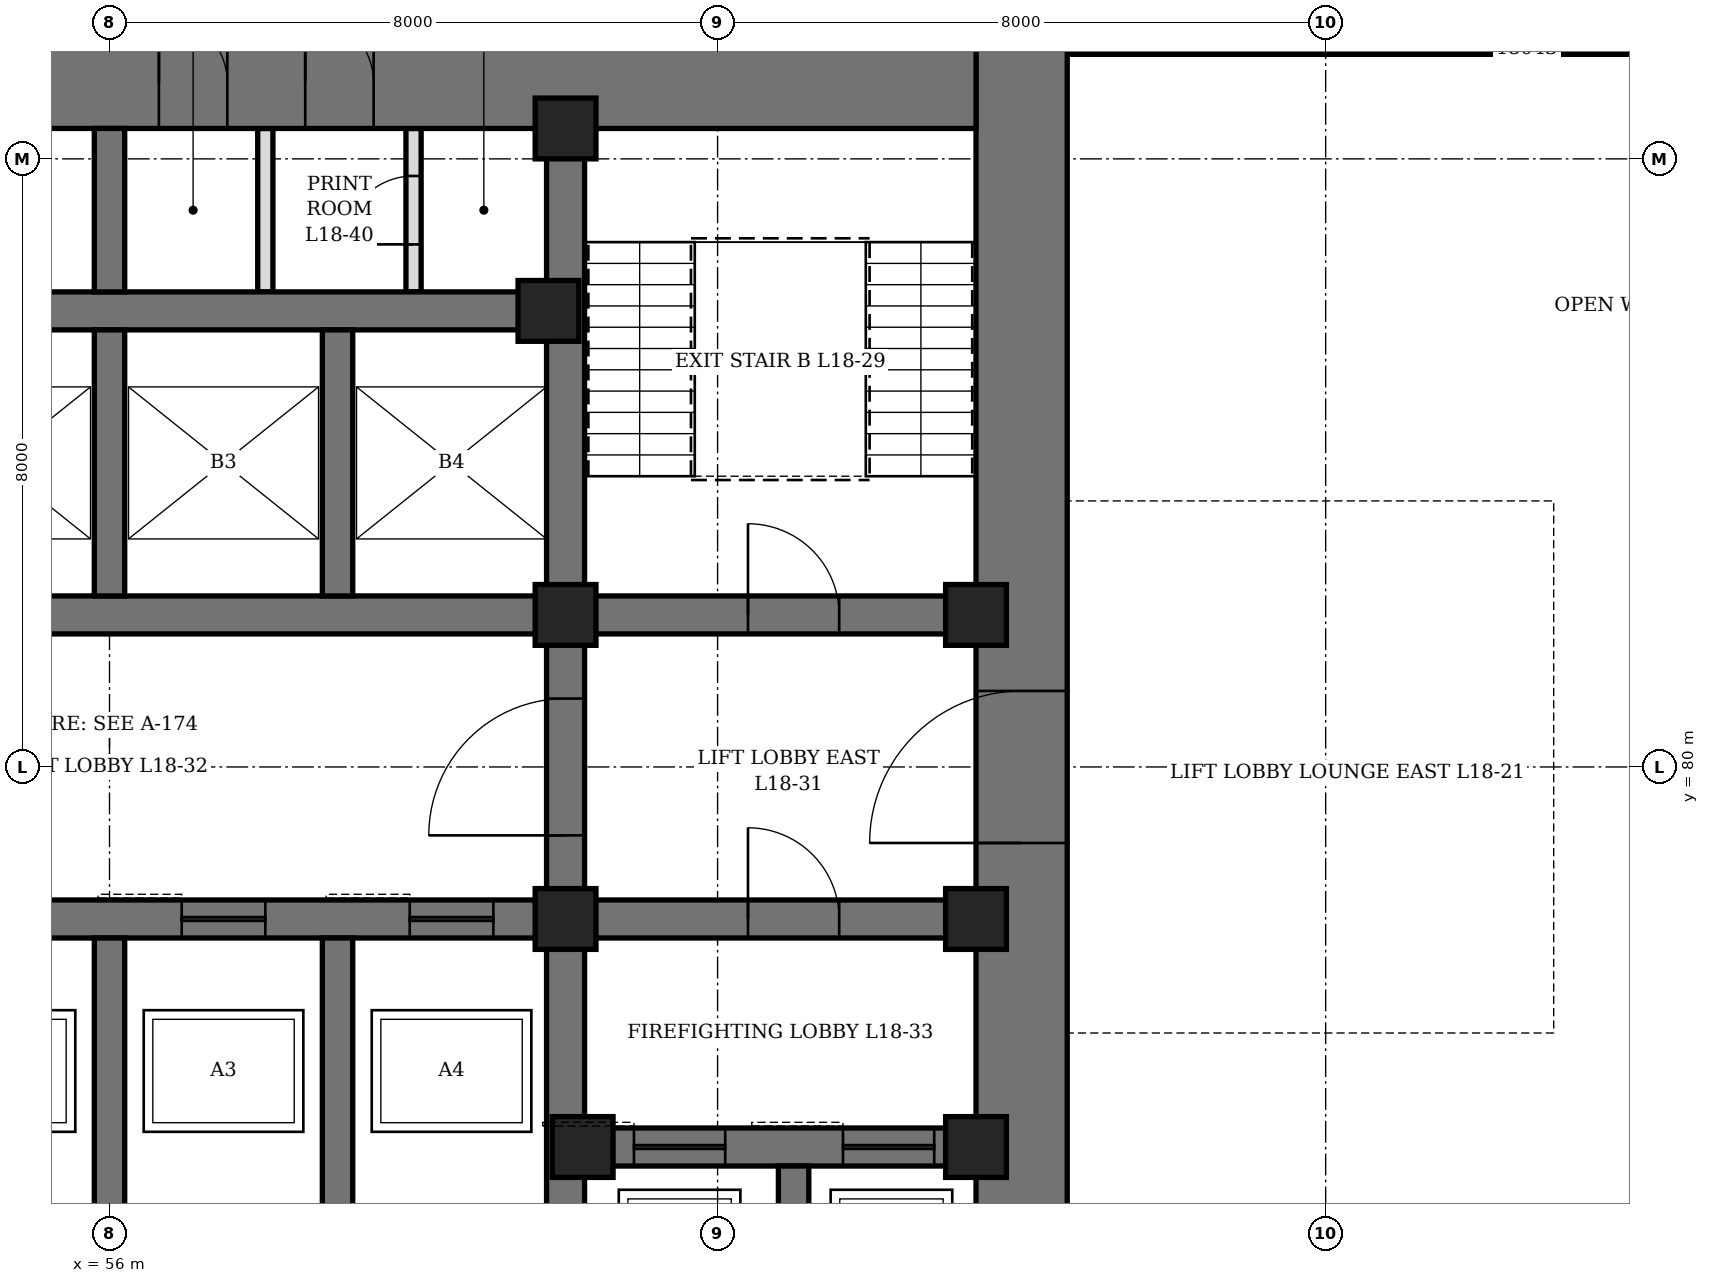
"""IFC4 building model, lengths in metres.
Left out: names, types, materials, properties, quantities, classifications, styles, units other than length and angle.
Written with IfcOpenShell. Run it as: python <this file> out.ifc"""

import sys

from ifc_helpers import new_model, si_unit, direction, frame, frame_2d, origin, origin_2d, place, context, subcontext, project, spatial, rectangle, hollow_rectangle, extrude, element, fill, save


model = new_model("IFC4")
c1 = context("Model", 3, precision=1e-05, world=origin(), true_north=direction((0.0, 1.0)))
c2 = subcontext(c1, "Body", "Model", "MODEL_VIEW")
j1 = project(units=[si_unit("LENGTHUNIT", "METRE"), si_unit("PLANEANGLEUNIT", "RADIAN")], contexts=[c1])
p1 = place(None, origin())
s1 = spatial("IfcSite", under=j1, at=p1, CompositionType="ELEMENT")
p2 = place(p1, origin())
s2 = spatial("IfcBuilding", under=s1, at=p2, CompositionType="ELEMENT")
p3 = place(p2, frame((0.0, 0.0, 85.3)))
s3 = spatial("IfcBuildingStorey", under=s2, at=p3, CompositionType="ELEMENT", Elevation=85.3)
p4 = place(p3, frame((68.0, 70.4, 0.0), z_axis=(0.0, 0.0, 1.0), x_axis=(0.0, 1.0, 0.0)))
e1 = element("IfcWall", 1, at=p4, inside=s3, PredefinedType="SHEAR", context=c2, shape_type="SweptSolid", body=[
    extrude(rectangle(XDim=19.2, YDim=1.2, at=frame_2d((9.6, 0.0))), origin(), (0.0, 0.0, 1.0), 4.2),
])
p5 = place(p4, frame((8.6, 0.0, 0.0)))
e2 = element("IfcOpeningElement", 2, at=p5, cuts=e1, PredefinedType="OPENING", context=c2, shape_type="SweptSolid", body=[
    extrude(rectangle(XDim=2.0, YDim=2.4, at=frame_2d((1.0, 1.2))), frame((0.0, 0.61, 0.0), z_axis=(0.0, -1.0, 0.0), x_axis=(1.0, 0.0, 0.0)), (0.0, 0.0, 1.0), 1.22),
])
p6 = place(p3, frame((44.6, 89.0, 0.0), z_axis=(0.0, 0.0, 1.0), x_axis=(1.0, 0.0, 0.0)))
e3 = element("IfcWall", 3, at=p6, inside=s3, PredefinedType="SHEAR", context=c2, shape_type="SweptSolid", body=[
    extrude(rectangle(XDim=22.8, YDim=1.2, at=frame_2d((11.4, 0.0))), origin(), (0.0, 0.0, 1.0), 4.2),
])
p7 = place(p6, frame((7.9, 0.0, 0.0)))
e4 = element("IfcOpeningElement", 4, at=p7, cuts=e3, PredefinedType="OPENING", context=c2, shape_type="SweptSolid", body=[
    extrude(rectangle(XDim=1.0, YDim=2.1, at=frame_2d((0.5, 1.05))), frame((0.0, 0.61, 0.0), z_axis=(0.0, -1.0, 0.0), x_axis=(1.0, 0.0, 0.0)), (0.0, 0.0, 1.0), 1.22),
])
p8 = place(p6, frame((12.05, 0.0, 0.0)))
e5 = element("IfcOpeningElement", 5, at=p8, cuts=e3, PredefinedType="OPENING", context=c2, shape_type="SweptSolid", body=[
    extrude(rectangle(XDim=0.9, YDim=2.1, at=frame_2d((0.45, 1.05))), frame((0.0, 0.61, 0.0), z_axis=(0.0, -1.0, 0.0), x_axis=(1.0, 0.0, 0.0)), (0.0, 0.0, 1.0), 1.22),
])
p9 = place(p6, frame((13.975, 0.0, 0.0)))
e6 = element("IfcOpeningElement", 6, at=p9, cuts=e3, PredefinedType="OPENING", context=c2, shape_type="SweptSolid", body=[
    extrude(rectangle(XDim=0.9, YDim=2.1, at=frame_2d((0.45, 1.05))), frame((0.0, 0.61, 0.0), z_axis=(0.0, -1.0, 0.0), x_axis=(1.0, 0.0, 0.0)), (0.0, 0.0, 1.0), 1.22),
])
p10 = place(p3, frame((62.0, 71.6, 0.0), z_axis=(0.0, 0.0, 1.0), x_axis=(0.0, 1.0, 0.0)))
e7 = element("IfcWall", 7, at=p10, inside=s3, PredefinedType="SHEAR", context=c2, shape_type="SweptSolid", body=[
    extrude(rectangle(XDim=16.8, YDim=0.5, at=frame_2d((8.4, 0.0))), origin(), (0.0, 0.0, 1.0), 4.2),
])
p11 = place(p10, frame((7.5, 0.0, 0.0)))
e8 = element("IfcOpeningElement", 8, at=p11, cuts=e7, PredefinedType="OPENING", context=c2, shape_type="SweptSolid", body=[
    extrude(rectangle(XDim=1.8, YDim=2.4, at=frame_2d((0.9, 1.2))), frame((0.0, 0.26, 0.0), z_axis=(0.0, -1.0, 0.0), x_axis=(1.0, 0.0, 0.0)), (0.0, 0.0, 1.0), 0.52),
])
p12 = place(p3, frame((62.25, 75.0, 0.0), z_axis=(0.0, 0.0, 1.0), x_axis=(1.0, 0.0, 0.0)))
e9 = element("IfcWall", 9, at=p12, inside=s3, PredefinedType="SHEAR", context=c2, shape_type="SweptSolid", body=[
    extrude(rectangle(XDim=5.15, YDim=0.5, at=frame_2d((2.575, 0.0))), origin(), (0.0, 0.0, 1.0), 4.2),
])
p13 = place(p12, frame((0.65, 0.0, 0.0)))
e10 = element("IfcOpeningElement", 10, at=p13, cuts=e9, PredefinedType="OPENING", context=c2, shape_type="SweptSolid", body=[
    extrude(rectangle(XDim=1.2, YDim=2.2, at=frame_2d((0.6, 1.1))), frame((0.0, 0.26, 0.0), z_axis=(0.0, -1.0, 0.0), x_axis=(1.0, 0.0, 0.0)), (0.0, 0.0, 1.0), 0.52),
])
p14 = place(p12, frame((3.4, 0.0, 0.0)))
e11 = element("IfcOpeningElement", 11, at=p14, cuts=e9, PredefinedType="OPENING", context=c2, shape_type="SweptSolid", body=[
    extrude(rectangle(XDim=1.2, YDim=2.2, at=frame_2d((0.6, 1.1))), frame((0.0, 0.26, 0.0), z_axis=(0.0, -1.0, 0.0), x_axis=(1.0, 0.0, 0.0)), (0.0, 0.0, 1.0), 0.52),
])
p15 = place(p3, frame((62.25, 78.0, 0.0), z_axis=(0.0, 0.0, 1.0), x_axis=(1.0, 0.0, 0.0)))
e12 = element("IfcWall", 12, at=p15, inside=s3, PredefinedType="SHEAR", context=c2, shape_type="SweptSolid", body=[
    extrude(rectangle(XDim=5.15, YDim=0.5, at=frame_2d((2.575, 0.0))), origin(), (0.0, 0.0, 1.0), 4.2),
])
p16 = place(p15, frame((2.15, 0.0, 0.0)))
e13 = element("IfcOpeningElement", 13, at=p16, cuts=e12, PredefinedType="OPENING", context=c2, shape_type="SweptSolid", body=[
    extrude(rectangle(XDim=1.2, YDim=2.1, at=frame_2d((0.6, 1.05))), frame((0.0, 0.26, 0.0), z_axis=(0.0, -1.0, 0.0), x_axis=(1.0, 0.0, 0.0)), (0.0, 0.0, 1.0), 0.52),
])
p17 = place(p3, frame((62.25, 82.0, 0.0), z_axis=(0.0, 0.0, 1.0), x_axis=(1.0, 0.0, 0.0)))
e14 = element("IfcWall", 14, at=p17, inside=s3, PredefinedType="SHEAR", context=c2, shape_type="SweptSolid", body=[
    extrude(rectangle(XDim=5.15, YDim=0.5, at=frame_2d((2.575, 0.0))), origin(), (0.0, 0.0, 1.0), 4.2),
])
p18 = place(p17, frame((2.15, 0.0, 0.0)))
e15 = element("IfcOpeningElement", 15, at=p18, cuts=e14, PredefinedType="OPENING", context=c2, shape_type="SweptSolid", body=[
    extrude(rectangle(XDim=1.2, YDim=2.1, at=frame_2d((0.6, 1.05))), frame((0.0, 0.26, 0.0), z_axis=(0.0, -1.0, 0.0), x_axis=(1.0, 0.0, 0.0)), (0.0, 0.0, 1.0), 0.52),
])
p19 = place(p3, frame((50.25, 78.0, 0.0), z_axis=(0.0, 0.0, 1.0), x_axis=(1.0, 0.0, 0.0)))
e16 = element("IfcWall", 16, at=p19, inside=s3, PredefinedType="SHEAR", context=c2, shape_type="SweptSolid", body=[
    extrude(rectangle(XDim=11.5, YDim=0.5, at=frame_2d((5.75, 0.0))), origin(), (0.0, 0.0, 1.0), 4.2),
])
p20 = place(p19, frame((0.7, 0.0, 0.0)))
e17 = element("IfcOpeningElement", 17, at=p20, cuts=e16, PredefinedType="OPENING", context=c2, shape_type="SweptSolid", body=[
    extrude(rectangle(XDim=1.1, YDim=2.2, at=frame_2d((0.55, 1.1))), frame((0.0, 0.26, 0.0), z_axis=(0.0, -1.0, 0.0), x_axis=(1.0, 0.0, 0.0)), (0.0, 0.0, 1.0), 0.52),
])
p21 = place(p19, frame((3.7, 0.0, 0.0)))
e18 = element("IfcOpeningElement", 18, at=p21, cuts=e16, PredefinedType="OPENING", context=c2, shape_type="SweptSolid", body=[
    extrude(rectangle(XDim=1.1, YDim=2.2, at=frame_2d((0.55, 1.1))), frame((0.0, 0.26, 0.0), z_axis=(0.0, -1.0, 0.0), x_axis=(1.0, 0.0, 0.0)), (0.0, 0.0, 1.0), 0.52),
])
p22 = place(p19, frame((6.7, 0.0, 0.0)))
e19 = element("IfcOpeningElement", 19, at=p22, cuts=e16, PredefinedType="OPENING", context=c2, shape_type="SweptSolid", body=[
    extrude(rectangle(XDim=1.1, YDim=2.2, at=frame_2d((0.55, 1.1))), frame((0.0, 0.26, 0.0), z_axis=(0.0, -1.0, 0.0), x_axis=(1.0, 0.0, 0.0)), (0.0, 0.0, 1.0), 0.52),
])
p23 = place(p19, frame((9.7, 0.0, 0.0)))
e20 = element("IfcOpeningElement", 20, at=p23, cuts=e16, PredefinedType="OPENING", context=c2, shape_type="SweptSolid", body=[
    extrude(rectangle(XDim=1.1, YDim=2.2, at=frame_2d((0.55, 1.1))), frame((0.0, 0.26, 0.0), z_axis=(0.0, -1.0, 0.0), x_axis=(1.0, 0.0, 0.0)), (0.0, 0.0, 1.0), 0.52),
])
for number, where, z_axis, x_axis in (
    (21, (50.25, 82.0, 0.0), (0.0, 0.0, 1.0), (1.0, 0.0, 0.0)),
    (22, (50.25, 86.0, 0.0), (0.0, 0.0, 1.0), (1.0, 0.0, 0.0)),
):
    element("IfcWall", number, at=place(p3, frame(where, z_axis=z_axis, x_axis=x_axis)), inside=s3, PredefinedType="SHEAR", context=c2, shape_type="SweptSolid", body=[
        extrude(rectangle(XDim=11.5, YDim=0.5, at=frame_2d((5.75, 0.0))), origin(), (0.0, 0.0, 1.0), 4.2),
    ])
p24 = place(p3, frame((56.0, 74.2, 0.0), z_axis=(0.0, 0.0, 1.0), x_axis=(0.0, 1.0, 0.0)))
e23 = element("IfcWall", 23, at=p24, inside=s3, PredefinedType="SHEAR", context=c2, shape_type="SweptSolid", body=[
    extrude(rectangle(XDim=3.55, YDim=0.4, at=frame_2d((1.775, 0.0))), origin(), (0.0, 0.0, 1.0), 4.2),
])
p25 = place(p3, frame((56.0, 82.25, 0.0), z_axis=(0.0, 0.0, 1.0), x_axis=(0.0, 1.0, 0.0)))
e24 = element("IfcWall", 24, at=p25, inside=s3, PredefinedType="SHEAR", context=c2, shape_type="SweptSolid", body=[
    extrude(rectangle(XDim=3.5, YDim=0.4, at=frame_2d((1.75, 0.0))), origin(), (0.0, 0.0, 1.0), 4.2),
])
p26 = place(p3, frame((59.0, 74.2, 0.0), z_axis=(0.0, 0.0, 1.0), x_axis=(0.0, 1.0, 0.0)))
e25 = element("IfcWall", 25, at=p26, inside=s3, PredefinedType="SHEAR", context=c2, shape_type="SweptSolid", body=[
    extrude(rectangle(XDim=3.55, YDim=0.4, at=frame_2d((1.775, 0.0))), origin(), (0.0, 0.0, 1.0), 4.2),
])
p27 = place(p3, frame((59.0, 82.25, 0.0), z_axis=(0.0, 0.0, 1.0), x_axis=(0.0, 1.0, 0.0)))
e26 = element("IfcWall", 26, at=p27, inside=s3, PredefinedType="SHEAR", context=c2, shape_type="SweptSolid", body=[
    extrude(rectangle(XDim=3.5, YDim=0.4, at=frame_2d((1.75, 0.0))), origin(), (0.0, 0.0, 1.0), 4.2),
])
p28 = place(p3, frame((65.0, 71.6, 0.0), z_axis=(0.0, 0.0, 1.0), x_axis=(0.0, 1.0, 0.0)))
e27 = element("IfcWall", 27, at=p28, inside=s3, PredefinedType="SHEAR", context=c2, shape_type="SweptSolid", body=[
    extrude(rectangle(XDim=3.15, YDim=0.4, at=frame_2d((1.575, 0.0))), origin(), (0.0, 0.0, 1.0), 4.2),
])
p29 = place(p3, frame((56.0, 86.25, 0.0), z_axis=(0.0, 0.0, 1.0), x_axis=(0.0, 1.0, 0.0)))
e28 = element("IfcWall", 28, at=p29, inside=s3, PredefinedType="SHEAR", context=c2, shape_type="SweptSolid", body=[
    extrude(rectangle(XDim=2.15, YDim=0.4, at=frame_2d((1.075, 0.0))), origin(), (0.0, 0.0, 1.0), 4.2),
])
for number, where, z_axis, x_axis in (
    (29, (61.775, 86.0, 0.0), (0.0, 0.0, 1.0), (1.0, 0.0, 0.0)),
    (30, (62.0, 78.0, 0.0), (0.0, 0.0, 1.0), (1.0, 0.0, 0.0)),
    (31, (62.0, 82.0, 0.0), (0.0, 0.0, 1.0), (1.0, 0.0, 0.0)),
    (32, (62.0, 88.4, 0.0), (0.0, 0.0, 1.0), (1.0, 0.0, 0.0)),
    (33, (62.225, 75.0, 0.0), (0.0, 0.0, 1.0), (1.0, 0.0, 0.0)),
    (34, (67.4, 75.0, 0.0), (0.0, 0.0, 1.0), (1.0, 0.0, 0.0)),
    (35, (67.4, 78.0, 0.0), (0.0, 0.0, 1.0), (1.0, 0.0, 0.0)),
    (36, (67.4, 82.0, 0.0), (0.0, 0.0, 1.0), (1.0, 0.0, 0.0)),
):
    element("IfcColumn", number, at=place(p3, frame(where, z_axis=z_axis, x_axis=x_axis)), inside=s3, PredefinedType="COLUMN", context=c2, shape_type="SweptSolid", body=[
        extrude(hollow_rectangle(XDim=0.8, YDim=0.8, WallThickness=0.1, at=origin_2d()), origin(), (0.0, 0.0, 1.0), 4.2),
    ])
p30 = place(p3, frame((60.0, 86.25, 0.0), z_axis=(0.0, 0.0, 1.0), x_axis=(0.0, 1.0, 0.0)))
e37 = element("IfcWall", 37, at=p30, inside=s3, PredefinedType="PARTITIONING", context=c2, shape_type="SweptSolid", body=[
    extrude(rectangle(XDim=2.15, YDim=0.2, at=frame_2d((1.075, 0.0))), origin(), (0.0, 0.0, 1.0), 4.04),
])
p31 = place(p30, frame((0.625, 0.0, 0.0)))
e38 = element("IfcOpeningElement", 38, at=p31, cuts=e37, PredefinedType="OPENING", context=c2, shape_type="SweptSolid", body=[
    extrude(rectangle(XDim=0.9, YDim=2.1, at=frame_2d((0.45, 1.05))), frame((0.0, 0.11, 0.0), z_axis=(0.0, -1.0, 0.0), x_axis=(1.0, 0.0, 0.0)), (0.0, 0.0, 1.0), 0.22),
])
p32 = place(p3, frame((58.05, 86.25, 0.0), z_axis=(0.0, 0.0, 1.0), x_axis=(0.0, 1.0, 0.0)))
e39 = element("IfcWall", 39, at=p32, inside=s3, PredefinedType="PARTITIONING", context=c2, shape_type="SweptSolid", body=[
    extrude(rectangle(XDim=2.15, YDim=0.2, at=frame_2d((1.075, 0.0))), origin(), (0.0, 0.0, 1.0), 4.04),
])
p33 = place(p3, frame((68.6, 89.45, 0.0), z_axis=(0.0, 0.0, 1.0), x_axis=(1.0, 0.0, 0.0)))
e40 = element("IfcWall", 40, at=p33, inside=s3, PredefinedType="PARTITIONING", context=c2, shape_type="SweptSolid", body=[
    extrude(rectangle(XDim=12.09, YDim=0.15, at=frame_2d((6.045, 0.0))), origin(), (0.0, 0.0, 1.0), 4.04),
])
p34 = place(p33, frame((5.545, 0.0, 0.0)))
e41 = element("IfcOpeningElement", 41, at=p34, cuts=e40, PredefinedType="OPENING", context=c2, shape_type="SweptSolid", body=[
    extrude(rectangle(XDim=1.0, YDim=2.4, at=frame_2d((0.5, 1.2))), frame((0.0, 0.085, 0.0), z_axis=(0.0, -1.0, 0.0), x_axis=(1.0, 0.0, 0.0)), (0.0, 0.0, 1.0), 0.17),
])
p35 = place(p8, origin())
e42 = element("IfcDoor", 42, at=p35, inside=s3, OperationType="SINGLE_SWING_LEFT", PredefinedType="DOOR", context=c2, shape_type="SweptSolid", body=[
    extrude(rectangle(XDim=0.9, YDim=2.1, at=frame_2d((0.45, 1.05))), frame((0.0, 0.35, 0.0), z_axis=(0.0, -1.0, 0.0), x_axis=(1.0, 0.0, 0.0)), (0.0, 0.0, 1.0), 0.7),
])
fill(e5, e42)
p36 = place(p9, origin())
e43 = element("IfcDoor", 43, at=p36, inside=s3, OperationType="SINGLE_SWING_LEFT", PredefinedType="DOOR", context=c2, shape_type="SweptSolid", body=[
    extrude(rectangle(XDim=0.9, YDim=2.1, at=frame_2d((0.45, 1.05))), frame((0.0, 0.35, 0.0), z_axis=(0.0, -1.0, 0.0), x_axis=(1.0, 0.0, 0.0)), (0.0, 0.0, 1.0), 0.7),
])
fill(e6, e43)
p37 = place(p31, origin())
e44 = element("IfcDoor", 44, at=p37, inside=s3, OperationType="SINGLE_SWING_LEFT", PredefinedType="DOOR", context=c2, shape_type="SweptSolid", body=[
    extrude(rectangle(XDim=0.9, YDim=2.1, at=frame_2d((0.45, 1.05))), frame((0.0, 0.1, 0.0), z_axis=(0.0, -1.0, 0.0), x_axis=(1.0, 0.0, 0.0)), (0.0, 0.0, 1.0), 0.199),
])
fill(e38, e44)
p38 = place(p18, origin())
e45 = element("IfcDoor", 45, at=p38, inside=s3, OperationType="SINGLE_SWING_LEFT", PredefinedType="DOOR", context=c2, shape_type="SweptSolid", body=[
    extrude(rectangle(XDim=1.2, YDim=2.1, at=frame_2d((0.6, 1.05))), frame((0.0, 0.25, 0.0), z_axis=(0.0, -1.0, 0.0), x_axis=(1.0, 0.0, 0.0)), (0.0, 0.0, 1.0), 0.5),
])
fill(e15, e45)
p39 = place(p5, origin())
e46 = element("IfcDoor", 46, at=p39, inside=s3, OperationType="DOUBLE_DOOR_SINGLE_SWING", PredefinedType="DOOR", context=c2, shape_type="SweptSolid", body=[
    extrude(rectangle(XDim=2.0, YDim=2.4, at=frame_2d((1.0, 1.2))), frame((0.0, 0.35, 0.0), z_axis=(0.0, -1.0, 0.0), x_axis=(1.0, 0.0, 0.0)), (0.0, 0.0, 1.0), 0.7),
])
fill(e2, e46)
p40 = place(p11, origin())
e47 = element("IfcDoor", 47, at=p40, inside=s3, OperationType="DOUBLE_DOOR_SINGLE_SWING", PredefinedType="DOOR", context=c2, shape_type="SweptSolid", body=[
    extrude(rectangle(XDim=1.8, YDim=2.4, at=frame_2d((0.9, 1.2))), frame((0.0, 0.25, 0.0), z_axis=(0.0, -1.0, 0.0), x_axis=(1.0, 0.0, 0.0)), (0.0, 0.0, 1.0), 0.5),
])
fill(e8, e47)
p41 = place(p16, origin())
e48 = element("IfcDoor", 48, at=p41, inside=s3, OperationType="SINGLE_SWING_RIGHT", PredefinedType="DOOR", context=c2, shape_type="SweptSolid", body=[
    extrude(rectangle(XDim=1.2, YDim=2.1, at=frame_2d((0.6, 1.05))), frame((0.0, 0.25, 0.0), z_axis=(0.0, -1.0, 0.0), x_axis=(1.0, 0.0, 0.0)), (0.0, 0.0, 1.0), 0.5),
])
fill(e13, e48)
p42 = place(p22, origin())
e49 = element("IfcDoor", 49, at=p42, inside=s3, OperationType="SLIDING_TO_LEFT", PredefinedType="DOOR", context=c2, shape_type="SweptSolid", body=[
    extrude(rectangle(XDim=1.1, YDim=2.2, at=frame_2d((0.55, 1.1))), frame((0.0, 0.25, 0.0), z_axis=(0.0, -1.0, 0.0), x_axis=(1.0, 0.0, 0.0)), (0.0, 0.0, 1.0), 0.5),
])
fill(e19, e49)
p43 = place(p23, origin())
e50 = element("IfcDoor", 50, at=p43, inside=s3, OperationType="SLIDING_TO_LEFT", PredefinedType="DOOR", context=c2, shape_type="SweptSolid", body=[
    extrude(rectangle(XDim=1.1, YDim=2.2, at=frame_2d((0.55, 1.1))), frame((0.0, 0.25, 0.0), z_axis=(0.0, -1.0, 0.0), x_axis=(1.0, 0.0, 0.0)), (0.0, 0.0, 1.0), 0.5),
])
fill(e20, e50)
p44 = place(p13, origin())
e51 = element("IfcDoor", 51, at=p44, inside=s3, OperationType="SLIDING_TO_LEFT", PredefinedType="DOOR", context=c2, shape_type="SweptSolid", body=[
    extrude(rectangle(XDim=1.2, YDim=2.2, at=frame_2d((0.6, 1.1))), frame((0.0, 0.25, 0.0), z_axis=(0.0, -1.0, 0.0), x_axis=(1.0, 0.0, 0.0)), (0.0, 0.0, 1.0), 0.5),
])
fill(e10, e51)
p45 = place(p14, origin())
e52 = element("IfcDoor", 52, at=p45, inside=s3, OperationType="SLIDING_TO_LEFT", PredefinedType="DOOR", context=c2, shape_type="SweptSolid", body=[
    extrude(rectangle(XDim=1.2, YDim=2.2, at=frame_2d((0.6, 1.1))), frame((0.0, 0.25, 0.0), z_axis=(0.0, -1.0, 0.0), x_axis=(1.0, 0.0, 0.0)), (0.0, 0.0, 1.0), 0.5),
])
fill(e11, e52)
p46 = place(p34, origin())
e53 = element("IfcDoor", 53, at=p46, inside=s3, OperationType="SINGLE_SWING_RIGHT", PredefinedType="DOOR", context=c2, shape_type="SweptSolid", body=[
    extrude(rectangle(XDim=1.0, YDim=2.4, at=frame_2d((0.5, 1.2))), frame((0.0, 0.075, 0.0), z_axis=(0.0, -1.0, 0.0), x_axis=(1.0, 0.0, 0.0)), (0.0, 0.0, 1.0), 0.149),
])
fill(e41, e53)
save(model, sys.argv[1])
